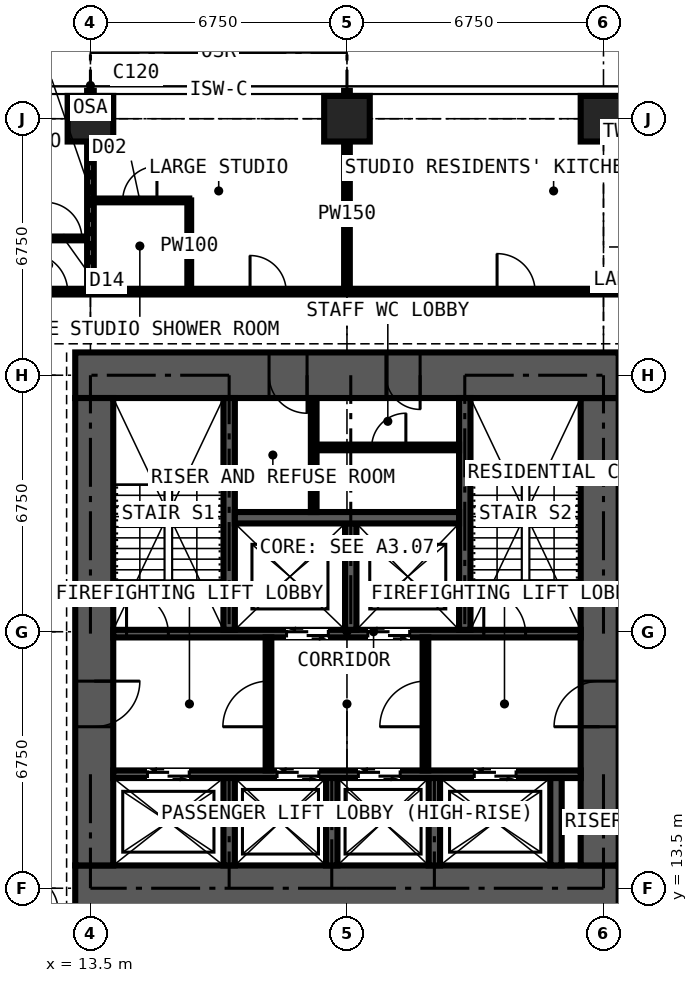
"""IFC4 building model, lengths in metres.
Left out: names, types, materials, properties, quantities, classifications, styles, units other than length and angle.
Written with IfcOpenShell. Run it as: python <this file> out.ifc"""

import sys

from ifc_helpers import new_model, si_unit, direction, frame, frame_2d, origin, origin_2d, place, context, subcontext, project, spatial, rectangle, extrude, element, fill, save


model = new_model("IFC4")
c1 = context("Model", 3, precision=1e-05, world=origin(), true_north=direction((0.0, 1.0)))
c2 = subcontext(c1, "Body", "Model", "MODEL_VIEW")
j1 = project(units=[si_unit("LENGTHUNIT", "METRE"), si_unit("PLANEANGLEUNIT", "RADIAN")], contexts=[c1])
p1 = place(None, origin())
s1 = spatial("IfcSite", under=j1, at=p1, CompositionType="ELEMENT")
p2 = place(p1, origin())
s2 = spatial("IfcBuilding", under=s1, at=p2, CompositionType="ELEMENT")
p3 = place(p2, frame((0.0, 0.0, 174.6)))
s3 = spatial("IfcBuildingStorey", under=s2, at=p3, CompositionType="ELEMENT", Elevation=174.6)
for number, where, z_axis, x_axis in (
    (1, (13.5, 33.75, 0.0), (0.0, 0.0, 1.0), (1.0, 0.0, 0.0)),
    (2, (20.25, 33.75, 0.0), (0.0, 0.0, 1.0), (1.0, 0.0, 0.0)),
    (3, (27.0, 33.75, 0.0), (0.0, 0.0, 1.0), (1.0, 0.0, 0.0)),
):
    element("IfcColumn", number, at=place(p3, frame(where, z_axis=z_axis, x_axis=x_axis)), inside=s3, PredefinedType="COLUMN", context=c2, shape_type="SweptSolid", body=[
        extrude(rectangle(XDim=1.2, YDim=1.2, at=origin_2d()), origin(), (0.0, 0.0, 1.0), 3.6),
    ])
p4 = place(p3, frame((13.1, 13.5, 0.0), z_axis=(0.0, 0.0, 1.0), x_axis=(1.0, 0.0, 0.0)))
e4 = element("IfcWall", 4, at=p4, inside=s3, PredefinedType="SHEAR", context=c2, shape_type="SweptSolid", body=[
    extrude(rectangle(XDim=14.3, YDim=1.2, at=frame_2d((7.15, 0.0))), origin(), (0.0, 0.0, 1.0), 3.6),
])
p5 = place(p3, frame((26.9, 14.1, 0.0), z_axis=(0.0, 0.0, 1.0), x_axis=(0.0, 1.0, 0.0)))
e5 = element("IfcWall", 5, at=p5, inside=s3, PredefinedType="SHEAR", context=c2, shape_type="SweptSolid", body=[
    extrude(rectangle(XDim=12.3, YDim=1.0, at=frame_2d((6.15, 0.0))), origin(), (0.0, 0.0, 1.0), 3.6),
])
p6 = place(p5, frame((3.65, 0.0, 0.0)))
e6 = element("IfcOpeningElement", 6, at=p6, cuts=e5, PredefinedType="OPENING", context=c2, shape_type="SweptSolid", body=[
    extrude(rectangle(XDim=1.2, YDim=2.2, at=frame_2d((0.6, 1.1))), frame((0.0, 0.51, 0.0), z_axis=(0.0, -1.0, 0.0), x_axis=(1.0, 0.0, 0.0)), (0.0, 0.0, 1.0), 1.02),
])
p7 = place(p3, frame((27.4, 27.0, 0.0), z_axis=(0.0, 0.0, 1.0), x_axis=(-1.0, 0.0, 0.0)))
e7 = element("IfcWall", 7, at=p7, inside=s3, PredefinedType="SHEAR", context=c2, shape_type="SweptSolid", body=[
    extrude(rectangle(XDim=14.3, YDim=1.2, at=frame_2d((7.15, 0.0))), origin(), (0.0, 0.0, 1.0), 3.6),
])
p8 = place(p7, frame((5.225, 0.0, 0.0)))
e8 = element("IfcOpeningElement", 8, at=p8, cuts=e7, PredefinedType="OPENING", context=c2, shape_type="SweptSolid", body=[
    extrude(rectangle(XDim=0.9, YDim=2.2, at=frame_2d((0.45, 1.1))), frame((0.0, 0.61, 0.0), z_axis=(0.0, -1.0, 0.0), x_axis=(1.0, 0.0, 0.0)), (0.0, 0.0, 1.0), 1.22),
])
p9 = place(p7, frame((8.2, 0.0, 0.0)))
e9 = element("IfcOpeningElement", 9, at=p9, cuts=e7, PredefinedType="OPENING", context=c2, shape_type="SweptSolid", body=[
    extrude(rectangle(XDim=1.0, YDim=2.2, at=frame_2d((0.5, 1.1))), frame((0.0, 0.61, 0.0), z_axis=(0.0, -1.0, 0.0), x_axis=(1.0, 0.0, 0.0)), (0.0, 0.0, 1.0), 1.22),
])
p10 = place(p3, frame((13.6, 26.4, 0.0), z_axis=(0.0, 0.0, 1.0), x_axis=(0.0, -1.0, 0.0)))
e10 = element("IfcWall", 10, at=p10, inside=s3, PredefinedType="SHEAR", context=c2, shape_type="SweptSolid", body=[
    extrude(rectangle(XDim=12.3, YDim=1.0, at=frame_2d((6.15, 0.0))), origin(), (0.0, 0.0, 1.0), 3.6),
])
p11 = place(p10, frame((7.45, 0.0, 0.0)))
e11 = element("IfcOpeningElement", 11, at=p11, cuts=e10, PredefinedType="OPENING", context=c2, shape_type="SweptSolid", body=[
    extrude(rectangle(XDim=1.2, YDim=2.2, at=frame_2d((0.6, 1.1))), frame((0.0, 0.51, 0.0), z_axis=(0.0, -1.0, 0.0), x_axis=(1.0, 0.0, 0.0)), (0.0, 0.0, 1.0), 1.02),
])
p12 = place(p3, frame((14.1, 16.5, 0.0), z_axis=(0.0, 0.0, 1.0), x_axis=(1.0, 0.0, 0.0)))
e12 = element("IfcWall", 12, at=p12, inside=s3, PredefinedType="SHEAR", context=c2, shape_type="SweptSolid", body=[
    extrude(rectangle(XDim=12.3, YDim=0.2, at=frame_2d((6.15, 0.0))), origin(), (0.0, 0.0, 1.0), 3.6),
])
p13 = place(p12, frame((0.9, 0.0, 0.0)))
e13 = element("IfcOpeningElement", 13, at=p13, cuts=e12, PredefinedType="OPENING", context=c2, shape_type="SweptSolid", body=[
    extrude(rectangle(XDim=1.1, YDim=2.2, at=frame_2d((0.55, 1.1))), frame((0.0, 0.11, 0.0), z_axis=(0.0, -1.0, 0.0), x_axis=(1.0, 0.0, 0.0)), (0.0, 0.0, 1.0), 0.22),
])
p14 = place(p12, frame((4.31, 0.0, 0.0)))
e14 = element("IfcOpeningElement", 14, at=p14, cuts=e12, PredefinedType="OPENING", context=c2, shape_type="SweptSolid", body=[
    extrude(rectangle(XDim=1.1, YDim=2.2, at=frame_2d((0.55, 1.1))), frame((0.0, 0.11, 0.0), z_axis=(0.0, -1.0, 0.0), x_axis=(1.0, 0.0, 0.0)), (0.0, 0.0, 1.0), 0.22),
])
p15 = place(p12, frame((6.45, 0.0, 0.0)))
e15 = element("IfcOpeningElement", 15, at=p15, cuts=e12, PredefinedType="OPENING", context=c2, shape_type="SweptSolid", body=[
    extrude(rectangle(XDim=1.1, YDim=2.2, at=frame_2d((0.55, 1.1))), frame((0.0, 0.11, 0.0), z_axis=(0.0, -1.0, 0.0), x_axis=(1.0, 0.0, 0.0)), (0.0, 0.0, 1.0), 0.22),
])
p16 = place(p12, frame((9.5, 0.0, 0.0)))
e16 = element("IfcOpeningElement", 16, at=p16, cuts=e12, PredefinedType="OPENING", context=c2, shape_type="SweptSolid", body=[
    extrude(rectangle(XDim=1.1, YDim=2.2, at=frame_2d((0.55, 1.1))), frame((0.0, 0.11, 0.0), z_axis=(0.0, -1.0, 0.0), x_axis=(1.0, 0.0, 0.0)), (0.0, 0.0, 1.0), 0.22),
])
p17 = place(p3, frame((14.1, 20.2, 0.0), z_axis=(0.0, 0.0, 1.0), x_axis=(1.0, 0.0, 0.0)))
e17 = element("IfcWall", 17, at=p17, inside=s3, PredefinedType="SHEAR", context=c2, shape_type="SweptSolid", body=[
    extrude(rectangle(XDim=12.3, YDim=0.2, at=frame_2d((6.15, 0.0))), origin(), (0.0, 0.0, 1.0), 3.6),
])
p18 = place(p17, frame((4.56, 0.0, 0.0)))
e18 = element("IfcOpeningElement", 18, at=p18, cuts=e17, PredefinedType="OPENING", context=c2, shape_type="SweptSolid", body=[
    extrude(rectangle(XDim=1.1, YDim=2.2, at=frame_2d((0.55, 1.1))), frame((0.0, 0.11, 0.0), z_axis=(0.0, -1.0, 0.0), x_axis=(1.0, 0.0, 0.0)), (0.0, 0.0, 1.0), 0.22),
])
p19 = place(p17, frame((6.7, 0.0, 0.0)))
e19 = element("IfcOpeningElement", 19, at=p19, cuts=e17, PredefinedType="OPENING", context=c2, shape_type="SweptSolid", body=[
    extrude(rectangle(XDim=1.1, YDim=2.2, at=frame_2d((0.55, 1.1))), frame((0.0, 0.11, 0.0), z_axis=(0.0, -1.0, 0.0), x_axis=(1.0, 0.0, 0.0)), (0.0, 0.0, 1.0), 0.22),
])
p20 = place(p17, frame((0.35, 0.0, 0.0)))
e20 = element("IfcOpeningElement", 20, at=p20, cuts=e17, PredefinedType="OPENING", context=c2, shape_type="SweptSolid", body=[
    extrude(rectangle(XDim=1.1, YDim=2.2, at=frame_2d((0.55, 1.1))), frame((0.0, 0.11, 0.0), z_axis=(0.0, -1.0, 0.0), x_axis=(1.0, 0.0, 0.0)), (0.0, 0.0, 1.0), 0.22),
])
p21 = place(p17, frame((9.75, 0.0, 0.0)))
e21 = element("IfcOpeningElement", 21, at=p21, cuts=e17, PredefinedType="OPENING", context=c2, shape_type="SweptSolid", body=[
    extrude(rectangle(XDim=1.1, YDim=2.2, at=frame_2d((0.55, 1.1))), frame((0.0, 0.11, 0.0), z_axis=(0.0, -1.0, 0.0), x_axis=(1.0, 0.0, 0.0)), (0.0, 0.0, 1.0), 0.22),
])
for number, where, z_axis, x_axis in (
    (22, (17.15, 20.3, 0.0), (0.0, 0.0, 1.0), (0.0, 1.0, 0.0)),
    (23, (23.35, 20.3, 0.0), (0.0, 0.0, 1.0), (0.0, 1.0, 0.0)),
):
    element("IfcWall", number, at=place(p3, frame(where, z_axis=z_axis, x_axis=x_axis)), inside=s3, PredefinedType="SHEAR", context=c2, shape_type="SweptSolid", body=[
        extrude(rectangle(XDim=6.1, YDim=0.3, at=frame_2d((3.05, 0.0))), origin(), (0.0, 0.0, 1.0), 3.6),
    ])
p22 = place(p3, frame((20.35, 20.3, 0.0), z_axis=(0.0, 0.0, 1.0), x_axis=(0.0, 1.0, 0.0)))
e24 = element("IfcWall", 24, at=p22, inside=s3, PredefinedType="SHEAR", context=c2, shape_type="SweptSolid", body=[
    extrude(rectangle(XDim=2.8, YDim=0.3, at=frame_2d((1.4, 0.0))), origin(), (0.0, 0.0, 1.0), 3.6),
])
p23 = place(p3, frame((17.3, 23.25, 0.0), z_axis=(0.0, 0.0, 1.0), x_axis=(1.0, 0.0, 0.0)))
e25 = element("IfcWall", 25, at=p23, inside=s3, PredefinedType="SHEAR", context=c2, shape_type="SweptSolid", body=[
    extrude(rectangle(XDim=5.9, YDim=0.3, at=frame_2d((2.95, 0.0))), origin(), (0.0, 0.0, 1.0), 3.6),
])
for number, where, z_axis, x_axis in (
    (26, (17.15, 14.1, 0.0), (0.0, 0.0, 1.0), (0.0, 1.0, 0.0)),
    (27, (19.85, 14.1, 0.0), (0.0, 0.0, 1.0), (0.0, 1.0, 0.0)),
    (28, (22.55, 14.1, 0.0), (0.0, 0.0, 1.0), (0.0, 1.0, 0.0)),
    (29, (25.75, 14.1, 0.0), (0.0, 0.0, 1.0), (0.0, 1.0, 0.0)),
):
    element("IfcWall", number, at=place(p3, frame(where, z_axis=z_axis, x_axis=x_axis)), inside=s3, PredefinedType="SHEAR", context=c2, shape_type="SweptSolid", body=[
        extrude(rectangle(XDim=2.3, YDim=0.3, at=frame_2d((1.15, 0.0))), origin(), (0.0, 0.0, 1.0), 3.6),
    ])
p24 = place(p3, frame((18.185, 16.6, 0.0), z_axis=(0.0, 0.0, 1.0), x_axis=(0.0, 1.0, 0.0)))
e30 = element("IfcWall", 30, at=p24, inside=s3, PredefinedType="PARTITIONING", context=c2, shape_type="SweptSolid", body=[
    extrude(rectangle(XDim=3.5, YDim=0.15, at=frame_2d((1.75, 0.0))), origin(), (0.0, 0.0, 1.0), 3.375),
])
p25 = place(p24, frame((1.15, 0.0, 0.0)))
e31 = element("IfcOpeningElement", 31, at=p25, cuts=e30, PredefinedType="OPENING", context=c2, shape_type="SweptSolid", body=[
    extrude(rectangle(XDim=1.2, YDim=2.2, at=frame_2d((0.6, 1.1))), frame((0.0, 0.085, 0.0), z_axis=(0.0, -1.0, 0.0), x_axis=(1.0, 0.0, 0.0)), (0.0, 0.0, 1.0), 0.17),
])
p26 = place(p3, frame((22.315, 16.6, 0.0), z_axis=(0.0, 0.0, 1.0), x_axis=(0.0, 1.0, 0.0)))
e32 = element("IfcWall", 32, at=p26, inside=s3, PredefinedType="PARTITIONING", context=c2, shape_type="SweptSolid", body=[
    extrude(rectangle(XDim=3.5, YDim=0.15, at=frame_2d((1.75, 0.0))), origin(), (0.0, 0.0, 1.0), 3.375),
])
p27 = place(p26, frame((1.15, 0.0, 0.0)))
e33 = element("IfcOpeningElement", 33, at=p27, cuts=e32, PredefinedType="OPENING", context=c2, shape_type="SweptSolid", body=[
    extrude(rectangle(XDim=1.2, YDim=2.2, at=frame_2d((0.6, 1.1))), frame((0.0, 0.085, 0.0), z_axis=(0.0, -1.0, 0.0), x_axis=(1.0, 0.0, 0.0)), (0.0, 0.0, 1.0), 0.17),
])
p28 = place(p3, frame((19.375, 23.4, 0.0), z_axis=(0.0, 0.0, 1.0), x_axis=(0.0, 1.0, 0.0)))
e34 = element("IfcWall", 34, at=p28, inside=s3, PredefinedType="PARTITIONING", context=c2, shape_type="SweptSolid", body=[
    extrude(rectangle(XDim=3.0, YDim=0.15, at=frame_2d((1.5, 0.0))), origin(), (0.0, 0.0, 1.0), 3.375),
])
p29 = place(p3, frame((19.45, 25.1, 0.0), z_axis=(0.0, 0.0, 1.0), x_axis=(1.0, 0.0, 0.0)))
e35 = element("IfcWall", 35, at=p29, inside=s3, PredefinedType="PARTITIONING", context=c2, shape_type="SweptSolid", body=[
    extrude(rectangle(XDim=3.75, YDim=0.15, at=frame_2d((1.875, 0.0))), origin(), (0.0, 0.0, 1.0), 3.375),
])
p30 = place(p29, frame((1.45, 0.0, 0.0)))
e36 = element("IfcOpeningElement", 36, at=p30, cuts=e35, PredefinedType="OPENING", context=c2, shape_type="SweptSolid", body=[
    extrude(rectangle(XDim=0.9, YDim=2.2, at=frame_2d((0.45, 1.1))), frame((0.0, 0.085, 0.0), z_axis=(0.0, -1.0, 0.0), x_axis=(1.0, 0.0, 0.0)), (0.0, 0.0, 1.0), 0.17),
])
p31 = place(p3, frame((10.125, 30.6, 0.0), z_axis=(0.0, 0.0, 1.0), x_axis=(1.0, 0.0, 0.0)))
e37 = element("IfcWall", 37, at=p31, inside=s3, PredefinedType="PARTITIONING", context=c2, shape_type="SweptSolid", body=[
    extrude(rectangle(XDim=3.375, YDim=0.1, at=frame_2d((1.688, 0.0))), origin(), (0.0, 0.0, 1.0), 3.375),
])
p32 = place(p31, frame((2.2, 0.0, 0.0)))
e38 = element("IfcOpeningElement", 38, at=p32, cuts=e37, PredefinedType="OPENING", context=c2, shape_type="SweptSolid", body=[
    extrude(rectangle(XDim=0.95, YDim=2.2, at=frame_2d((0.475, 1.1))), frame((0.0, 0.06, 0.0), z_axis=(0.0, -1.0, 0.0), x_axis=(1.0, 0.0, 0.0)), (0.0, 0.0, 1.0), 0.12),
])
p33 = place(p3, frame((11.3, 29.2, 0.0), z_axis=(0.0, 0.0, 1.0), x_axis=(1.0, 0.0, 0.0)))
e39 = element("IfcWall", 39, at=p33, inside=s3, PredefinedType="PARTITIONING", context=c2, shape_type="SweptSolid", body=[
    extrude(rectangle(XDim=19.809, YDim=0.15, at=frame_2d((9.904, 0.0))), origin(), (0.0, 0.0, 1.0), 3.375),
])
p34 = place(p33, frame((12.9, 0.0, 0.0)))
e40 = element("IfcOpeningElement", 40, at=p34, cuts=e39, PredefinedType="OPENING", context=c2, shape_type="SweptSolid", body=[
    extrude(rectangle(XDim=1.0, YDim=2.2, at=frame_2d((0.5, 1.1))), frame((0.0, 0.085, 0.0), z_axis=(0.0, -1.0, 0.0), x_axis=(1.0, 0.0, 0.0)), (0.0, 0.0, 1.0), 0.17),
])
p35 = place(p33, frame((6.4, 0.0, 0.0)))
e41 = element("IfcOpeningElement", 41, at=p35, cuts=e39, PredefinedType="OPENING", context=c2, shape_type="SweptSolid", body=[
    extrude(rectangle(XDim=0.95, YDim=2.2, at=frame_2d((0.475, 1.1))), frame((0.0, 0.085, 0.0), z_axis=(0.0, -1.0, 0.0), x_axis=(1.0, 0.0, 0.0)), (0.0, 0.0, 1.0), 0.17),
])
p36 = place(p33, frame((0.6, 0.0, 0.0)))
e42 = element("IfcOpeningElement", 42, at=p36, cuts=e39, PredefinedType="OPENING", context=c2, shape_type="SweptSolid", body=[
    extrude(rectangle(XDim=1.0, YDim=2.2, at=frame_2d((0.5, 1.1))), frame((0.0, 0.085, 0.0), z_axis=(0.0, -1.0, 0.0), x_axis=(1.0, 0.0, 0.0)), (0.0, 0.0, 1.0), 0.17),
])
p37 = place(p3, frame((13.5, 29.2, 0.0), z_axis=(0.0, 0.0, 1.0), x_axis=(0.0, 1.0, 0.0)))
e43 = element("IfcWall", 43, at=p37, inside=s3, PredefinedType="PARTITIONING", context=c2, shape_type="SweptSolid", body=[
    extrude(rectangle(XDim=5.284, YDim=0.175, at=frame_2d((2.642, 0.0))), origin(), (0.0, 0.0, 1.0), 2.61),
])
p38 = place(p3, frame((13.5, 31.6, 0.0), z_axis=(0.0, 0.0, 1.0), x_axis=(1.0, 0.0, 0.0)))
e44 = element("IfcWall", 44, at=p38, inside=s3, PredefinedType="PARTITIONING", context=c2, shape_type="SweptSolid", body=[
    extrude(rectangle(XDim=2.6, YDim=0.1, at=frame_2d((1.3, 0.0))), origin(), (0.0, 0.0, 1.0), 3.375),
])
p39 = place(p38, frame((0.85, 0.0, 0.0)))
e45 = element("IfcOpeningElement", 45, at=p39, cuts=e44, PredefinedType="OPENING", context=c2, shape_type="SweptSolid", body=[
    extrude(rectangle(XDim=0.9, YDim=2.2, at=frame_2d((0.45, 1.1))), frame((0.0, 0.06, 0.0), z_axis=(0.0, -1.0, 0.0), x_axis=(1.0, 0.0, 0.0)), (0.0, 0.0, 1.0), 0.12),
])
p40 = place(p3, frame((16.1, 29.2, 0.0), z_axis=(0.0, 0.0, 1.0), x_axis=(0.0, 1.0, 0.0)))
e46 = element("IfcWall", 46, at=p40, inside=s3, PredefinedType="PARTITIONING", context=c2, shape_type="SweptSolid", body=[
    extrude(rectangle(XDim=2.4, YDim=0.1, at=frame_2d((1.2, 0.0))), origin(), (0.0, 0.0, 1.0), 3.375),
])
p41 = place(p3, frame((20.25, 29.2, 0.0), z_axis=(0.0, 0.0, 1.0), x_axis=(0.0, 1.0, 0.0)))
e47 = element("IfcWall", 47, at=p41, inside=s3, PredefinedType="PARTITIONING", context=c2, shape_type="SweptSolid", body=[
    extrude(rectangle(XDim=5.284, YDim=0.15, at=frame_2d((2.642, 0.0))), origin(), (0.0, 0.0, 1.0), 2.61),
])
p42 = place(p13, origin())
e48 = element("IfcDoor", 48, at=p42, inside=s3, OperationType="DOUBLE_DOOR_SLIDING", PredefinedType="DOOR", context=c2, shape_type="SweptSolid", body=[
    extrude(rectangle(XDim=1.1, YDim=2.2, at=frame_2d((0.55, 1.1))), frame((0.0, 0.025, 0.0), z_axis=(0.0, -1.0, 0.0), x_axis=(1.0, 0.0, 0.0)), (0.0, 0.0, 1.0), 0.05),
])
fill(e13, e48)
p43 = place(p14, origin())
e49 = element("IfcDoor", 49, at=p43, inside=s3, OperationType="DOUBLE_DOOR_SLIDING", PredefinedType="DOOR", context=c2, shape_type="SweptSolid", body=[
    extrude(rectangle(XDim=1.1, YDim=2.2, at=frame_2d((0.55, 1.1))), frame((0.0, 0.025, 0.0), z_axis=(0.0, -1.0, 0.0), x_axis=(1.0, 0.0, 0.0)), (0.0, 0.0, 1.0), 0.05),
])
fill(e14, e49)
p44 = place(p15, origin())
e50 = element("IfcDoor", 50, at=p44, inside=s3, OperationType="DOUBLE_DOOR_SLIDING", PredefinedType="DOOR", context=c2, shape_type="SweptSolid", body=[
    extrude(rectangle(XDim=1.1, YDim=2.2, at=frame_2d((0.55, 1.1))), frame((0.0, 0.025, 0.0), z_axis=(0.0, -1.0, 0.0), x_axis=(1.0, 0.0, 0.0)), (0.0, 0.0, 1.0), 0.05),
])
fill(e15, e50)
p45 = place(p16, origin())
e51 = element("IfcDoor", 51, at=p45, inside=s3, OperationType="DOUBLE_DOOR_SLIDING", PredefinedType="DOOR", context=c2, shape_type="SweptSolid", body=[
    extrude(rectangle(XDim=1.1, YDim=2.2, at=frame_2d((0.55, 1.1))), frame((0.0, 0.025, 0.0), z_axis=(0.0, -1.0, 0.0), x_axis=(1.0, 0.0, 0.0)), (0.0, 0.0, 1.0), 0.05),
])
fill(e16, e51)
p46 = place(p18, origin())
e52 = element("IfcDoor", 52, at=p46, inside=s3, OperationType="DOUBLE_DOOR_SLIDING", PredefinedType="DOOR", context=c2, shape_type="SweptSolid", body=[
    extrude(rectangle(XDim=1.1, YDim=2.2, at=frame_2d((0.55, 1.1))), frame((0.0, 0.025, 0.0), z_axis=(0.0, -1.0, 0.0), x_axis=(1.0, 0.0, 0.0)), (0.0, 0.0, 1.0), 0.05),
])
fill(e18, e52)
p47 = place(p19, origin())
e53 = element("IfcDoor", 53, at=p47, inside=s3, OperationType="DOUBLE_DOOR_SLIDING", PredefinedType="DOOR", context=c2, shape_type="SweptSolid", body=[
    extrude(rectangle(XDim=1.1, YDim=2.2, at=frame_2d((0.55, 1.1))), frame((0.0, 0.025, 0.0), z_axis=(0.0, -1.0, 0.0), x_axis=(1.0, 0.0, 0.0)), (0.0, 0.0, 1.0), 0.05),
])
fill(e19, e53)
p48 = place(p11, origin())
e54 = element("IfcDoor", 54, at=p48, inside=s3, OperationType="DOUBLE_DOOR_SINGLE_SWING", PredefinedType="DOOR", context=c2, shape_type="SweptSolid", body=[
    extrude(rectangle(XDim=1.2, YDim=2.2, at=frame_2d((0.6, 1.1))), frame((0.0, 0.025, 0.0), z_axis=(0.0, -1.0, 0.0), x_axis=(1.0, 0.0, 0.0)), (0.0, 0.0, 1.0), 0.05),
])
fill(e11, e54)
p49 = place(p6, origin())
e55 = element("IfcDoor", 55, at=p49, inside=s3, OperationType="DOUBLE_DOOR_SINGLE_SWING", PredefinedType="DOOR", context=c2, shape_type="SweptSolid", body=[
    extrude(rectangle(XDim=1.2, YDim=2.2, at=frame_2d((0.6, 1.1))), frame((0.0, 0.025, 0.0), z_axis=(0.0, -1.0, 0.0), x_axis=(1.0, 0.0, 0.0)), (0.0, 0.0, 1.0), 0.05),
])
fill(e6, e55)
p50 = place(p25, origin())
e56 = element("IfcDoor", 56, at=p50, inside=s3, OperationType="DOUBLE_DOOR_SINGLE_SWING", PredefinedType="DOOR", context=c2, shape_type="SweptSolid", body=[
    extrude(rectangle(XDim=1.2, YDim=2.2, at=frame_2d((0.6, 1.1))), frame((0.0, 0.025, 0.0), z_axis=(0.0, -1.0, 0.0), x_axis=(1.0, 0.0, 0.0)), (0.0, 0.0, 1.0), 0.05),
])
fill(e31, e56)
p51 = place(p27, origin())
e57 = element("IfcDoor", 57, at=p51, inside=s3, OperationType="DOUBLE_DOOR_SINGLE_SWING", PredefinedType="DOOR", context=c2, shape_type="SweptSolid", body=[
    extrude(rectangle(XDim=1.2, YDim=2.2, at=frame_2d((0.6, 1.1))), frame((0.0, 0.025, 0.0), z_axis=(0.0, -1.0, 0.0), x_axis=(1.0, 0.0, 0.0)), (0.0, 0.0, 1.0), 0.05),
])
fill(e33, e57)
p52 = place(p30, origin())
e58 = element("IfcDoor", 58, at=p52, inside=s3, OperationType="SINGLE_SWING_RIGHT", PredefinedType="DOOR", context=c2, shape_type="SweptSolid", body=[
    extrude(rectangle(XDim=0.9, YDim=2.2, at=frame_2d((0.45, 1.1))), frame((0.0, 0.025, 0.0), z_axis=(0.0, -1.0, 0.0), x_axis=(1.0, 0.0, 0.0)), (0.0, 0.0, 1.0), 0.05),
])
fill(e36, e58)
p53 = place(p8, origin())
e59 = element("IfcDoor", 59, at=p53, inside=s3, OperationType="SINGLE_SWING_LEFT", PredefinedType="DOOR", context=c2, shape_type="SweptSolid", body=[
    extrude(rectangle(XDim=0.9, YDim=2.2, at=frame_2d((0.45, 1.1))), frame((0.0, 0.4, 0.0), z_axis=(0.0, -1.0, 0.0), x_axis=(1.0, 0.0, 0.0)), (0.0, 0.0, 1.0), 0.8),
])
fill(e8, e59)
p54 = place(p9, origin())
e60 = element("IfcDoor", 60, at=p54, inside=s3, OperationType="SINGLE_SWING_LEFT", PredefinedType="DOOR", context=c2, shape_type="SweptSolid", body=[
    extrude(rectangle(XDim=1.0, YDim=2.2, at=frame_2d((0.5, 1.1))), frame((0.0, 0.025, 0.0), z_axis=(0.0, -1.0, 0.0), x_axis=(1.0, 0.0, 0.0)), (0.0, 0.0, 1.0), 0.05),
])
fill(e9, e60)
p55 = place(p20, origin())
e61 = element("IfcDoor", 61, at=p55, inside=s3, OperationType="SINGLE_SWING_LEFT", PredefinedType="DOOR", context=c2, shape_type="SweptSolid", body=[
    extrude(rectangle(XDim=1.1, YDim=2.2, at=frame_2d((0.55, 1.1))), frame((0.0, 0.025, 0.0), z_axis=(0.0, -1.0, 0.0), x_axis=(1.0, 0.0, 0.0)), (0.0, 0.0, 1.0), 0.05),
])
fill(e20, e61)
p56 = place(p21, origin())
e62 = element("IfcDoor", 62, at=p56, inside=s3, OperationType="SINGLE_SWING_LEFT", PredefinedType="DOOR", context=c2, shape_type="SweptSolid", body=[
    extrude(rectangle(XDim=1.1, YDim=2.2, at=frame_2d((0.55, 1.1))), frame((0.0, 0.025, 0.0), z_axis=(0.0, -1.0, 0.0), x_axis=(1.0, 0.0, 0.0)), (0.0, 0.0, 1.0), 0.05),
])
fill(e21, e62)
p57 = place(p34, origin())
e63 = element("IfcDoor", 63, at=p57, inside=s3, OperationType="SINGLE_SWING_LEFT", PredefinedType="DOOR", context=c2, shape_type="SweptSolid", body=[
    extrude(rectangle(XDim=1.0, YDim=2.2, at=frame_2d((0.5, 1.1))), frame((0.0, 0.025, 0.0), z_axis=(0.0, -1.0, 0.0), x_axis=(1.0, 0.0, 0.0)), (0.0, 0.0, 1.0), 0.05),
])
fill(e40, e63)
p58 = place(p35, origin())
e64 = element("IfcDoor", 64, at=p58, inside=s3, OperationType="SINGLE_SWING_LEFT", PredefinedType="DOOR", context=c2, shape_type="SweptSolid", body=[
    extrude(rectangle(XDim=0.95, YDim=2.2, at=frame_2d((0.475, 1.1))), frame((0.0, 0.025, 0.0), z_axis=(0.0, -1.0, 0.0), x_axis=(1.0, 0.0, 0.0)), (0.0, 0.0, 1.0), 0.05),
])
fill(e41, e64)
p59 = place(p39, origin())
e65 = element("IfcDoor", 65, at=p59, inside=s3, OperationType="SINGLE_SWING_RIGHT", PredefinedType="DOOR", context=c2, shape_type="SweptSolid", body=[
    extrude(rectangle(XDim=0.9, YDim=2.2, at=frame_2d((0.45, 1.1))), frame((0.0, 0.025, 0.0), z_axis=(0.0, -1.0, 0.0), x_axis=(1.0, 0.0, 0.0)), (0.0, 0.0, 1.0), 0.05),
])
fill(e45, e65)
p60 = place(p32, origin())
e66 = element("IfcDoor", 66, at=p60, inside=s3, OperationType="SINGLE_SWING_LEFT", PredefinedType="DOOR", context=c2, shape_type="SweptSolid", body=[
    extrude(rectangle(XDim=0.95, YDim=2.2, at=frame_2d((0.475, 1.1))), frame((0.0, 0.025, 0.0), z_axis=(0.0, -1.0, 0.0), x_axis=(1.0, 0.0, 0.0)), (0.0, 0.0, 1.0), 0.05),
])
fill(e38, e66)
p61 = place(p36, origin())
e67 = element("IfcDoor", 67, at=p61, inside=s3, OperationType="SINGLE_SWING_LEFT", PredefinedType="DOOR", context=c2, shape_type="SweptSolid", body=[
    extrude(rectangle(XDim=1.0, YDim=2.2, at=frame_2d((0.5, 1.1))), frame((0.0, 0.025, 0.0), z_axis=(0.0, -1.0, 0.0), x_axis=(1.0, 0.0, 0.0)), (0.0, 0.0, 1.0), 0.05),
])
fill(e42, e67)
save(model, sys.argv[1])
